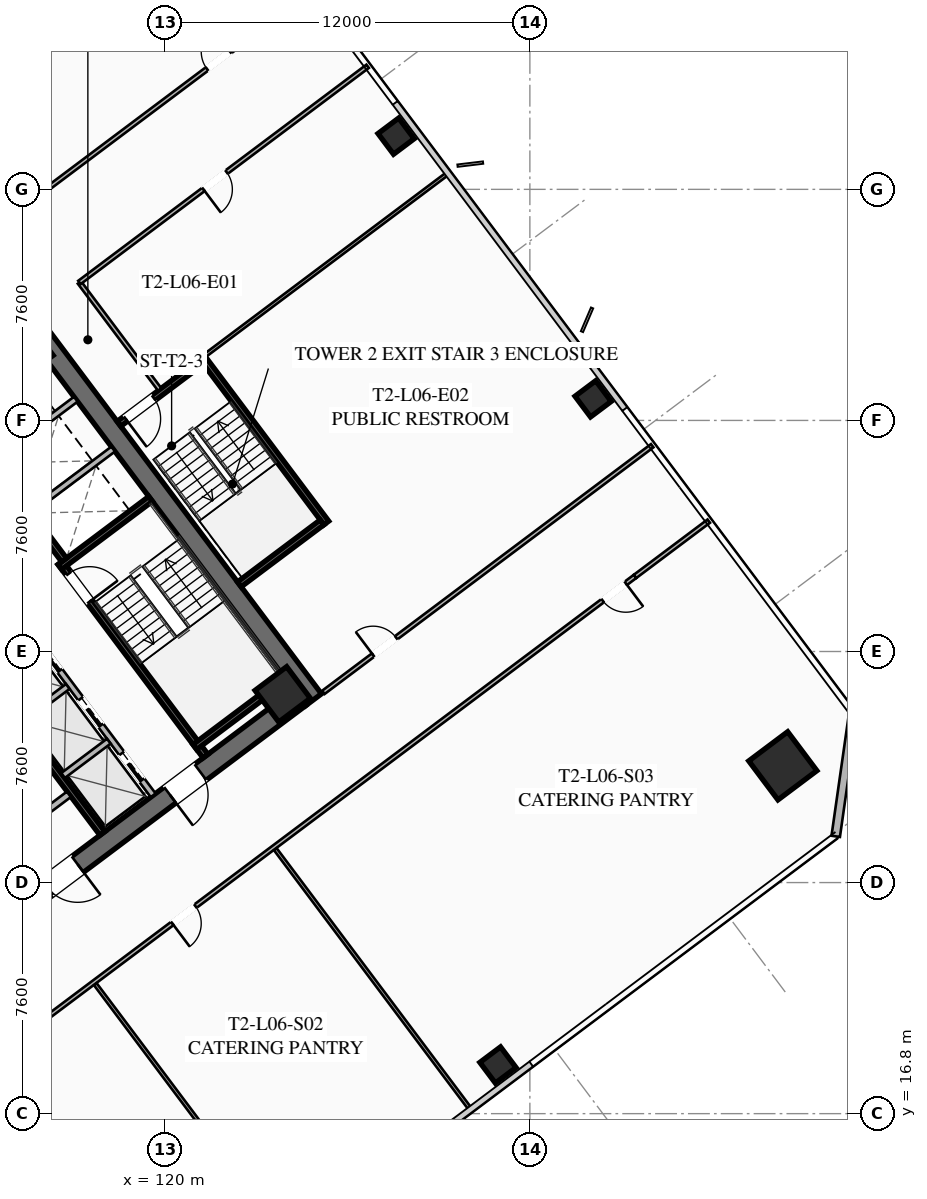
"""IFC4 building model, lengths in metres.
Left out: names, types, materials, properties, quantities, classifications, styles, units other than length and angle.
Written with IfcOpenShell. Run it as: python <this file> out.ifc"""

import sys

from ifc_helpers import new_model, si_unit, direction, frame, frame_2d, origin, origin_2d, place, context, subcontext, project, spatial, rectangle, hollow_rectangle, extrude, element, fill, save


model = new_model("IFC4")
c1 = context("Model", 3, precision=1e-05, world=origin(), true_north=direction((0.0, 1.0)))
c2 = subcontext(c1, "Body", "Model", "MODEL_VIEW")
j1 = project(units=[si_unit("LENGTHUNIT", "METRE"), si_unit("PLANEANGLEUNIT", "RADIAN")], contexts=[c1])
p1 = place(None, origin())
s1 = spatial("IfcSite", under=j1, at=p1, CompositionType="ELEMENT")
p2 = place(p1, origin())
s2 = spatial("IfcBuilding", under=s1, at=p2, CompositionType="ELEMENT")
p3 = place(p2, frame((0.0, 0.0, 28.15)))
s3 = spatial("IfcBuildingStorey", under=s2, at=p3, CompositionType="ELEMENT", Elevation=28.15)
p4 = place(p3, frame((115.524, 42.893, 0.0), z_axis=(0.0, 0.0, 1.0), x_axis=(0.600005007985, -0.799996243986, 0.0)))
e1 = element("IfcWall", 1, at=p4, inside=s3, PredefinedType="SHEAR", context=c2, shape_type="SweptSolid", body=[
    extrude(rectangle(XDim=15.6, YDim=0.65, at=frame_2d((7.8, 0.0))), origin(), (0.0, 0.0, 1.0), 3.55),
])
p5 = place(p3, frame((124.429, 30.478, 0.0), z_axis=(0.0, 0.0, 1.0), x_axis=(-0.799998028465, -0.600002628705, 0.0)))
e2 = element("IfcWall", 2, at=p5, inside=s3, PredefinedType="SHEAR", context=c2, shape_type="SweptSolid", body=[
    extrude(rectangle(XDim=14.86, YDim=0.65, at=frame_2d((7.43, 0.0))), origin(), (0.0, 0.0, 1.0), 3.55),
])
p6 = place(p5, frame((9.13, 0.0, 0.0)))
e3 = element("IfcOpeningElement", 3, at=p6, cuts=e2, PredefinedType="OPENING", context=c2, shape_type="SweptSolid", body=[
    extrude(rectangle(XDim=1.25, YDim=2.25, at=frame_2d((0.625, 1.125))), frame((0.0, 0.335, 0.0), z_axis=(0.0, -1.0, 0.0), x_axis=(1.0, 0.0, 0.0)), (0.0, 0.0, 1.0), 0.67),
])
p7 = place(p5, frame((4.08, 0.0, 0.0)))
e4 = element("IfcOpeningElement", 4, at=p7, cuts=e2, PredefinedType="OPENING", context=c2, shape_type="SweptSolid", body=[
    extrude(rectangle(XDim=1.25, YDim=2.25, at=frame_2d((0.625, 1.125))), frame((0.0, 0.335, 0.0), z_axis=(0.0, -1.0, 0.0), x_axis=(1.0, 0.0, 0.0)), (0.0, 0.0, 1.0), 0.67),
])
for number, where, z_axis, x_axis in (
    (5, (123.87, 30.59, 0.0), (0.0, 0.0, 1.0), (0.8, 0.6, 0.0)),
    (6, (115.41, 41.87, 0.0), (0.0, 0.0, 1.0), (0.8, 0.6, 0.0)),
):
    element("IfcColumn", number, at=place(p3, frame(where, z_axis=z_axis, x_axis=x_axis)), inside=s3, PredefinedType="COLUMN", context=c2, shape_type="SweptSolid", body=[
        extrude(hollow_rectangle(XDim=1.3, YDim=1.3, WallThickness=0.05, at=origin_2d()), origin(), (0.0, 0.0, 1.0), 3.35),
    ])
p8 = place(p3, frame((140.32, 28.24, 0.0), z_axis=(0.0, 0.0, 1.0), x_axis=(0.799999996291, 0.600000004945, 0.0)))
e7 = element("IfcColumn", 7, at=p8, inside=s3, PredefinedType="COLUMN", context=c2, shape_type="SweptSolid", body=[
    extrude(hollow_rectangle(XDim=1.6, YDim=1.6, WallThickness=0.06, at=origin_2d()), origin(), (0.0, 0.0, 1.0), 3.35),
])
for number, where, z_axis, x_axis in (
    (8, (130.95, 18.4, 0.0), (0.0, 0.0, 1.0), (0.8, 0.6, 0.0)),
    (9, (134.08, 40.31, 0.0), (0.0, 0.0, 1.0), (0.8, 0.6, 0.0)),
    (10, (127.6, 48.95, 0.0), (0.0, 0.0, 1.0), (0.8, 0.6, 0.0)),
):
    element("IfcColumn", number, at=place(p3, frame(where, z_axis=z_axis, x_axis=x_axis)), inside=s3, PredefinedType="COLUMN", context=c2, shape_type="SweptSolid", body=[
        extrude(hollow_rectangle(XDim=0.85, YDim=0.85, WallThickness=0.035, at=origin_2d()), origin(), (0.0, 0.0, 1.0), 3.35),
    ])
p9 = place(p3, frame((142.64, 29.98, 0.0), z_axis=(0.0, 0.0, 1.0), x_axis=(-0.14137968631, -0.989955445613, 0.0)))
e11 = element("IfcWall", 11, at=p9, inside=s3, PredefinedType="SOLIDWALL", context=c2, shape_type="SweptSolid", body=[
    extrude(rectangle(XDim=4.101, YDim=0.28, at=frame_2d((2.051, 0.0))), origin(), (0.0, 0.0, 1.0), 3.35),
])
p10 = place(p3, frame((116.56, 34.92, 0.0), z_axis=(0.0, 0.0, 1.0), x_axis=(0.600009827119, -0.799992629566, 0.0)))
e12 = element("IfcWall", 12, at=p10, inside=s3, PredefinedType="SHEAR", context=c2, shape_type="SweptSolid", body=[
    extrude(rectangle(XDim=7.95, YDim=0.2, at=frame_2d((3.975, 0.0))), origin(), (0.0, 0.0, 1.0), 3.35),
])
p11 = place(p10, frame((0.45, 0.0, 0.0)))
e13 = element("IfcOpeningElement", 13, at=p11, cuts=e12, PredefinedType="OPENING", context=c2, shape_type="SweptSolid", body=[
    extrude(rectangle(XDim=1.15, YDim=2.2, at=frame_2d((0.575, 1.1))), frame((0.0, 0.11, 0.0), z_axis=(0.0, -1.0, 0.0), x_axis=(1.0, 0.0, 0.0)), (0.0, 0.0, 1.0), 0.22),
])
for number, where, z_axis, x_axis in (
    (14, (116.54, 34.78, 0.0), (0.0, 0.0, 1.0), (0.8, 0.6, 0.0)),
    (15, (120.98, 28.86, 0.0), (0.0, 0.0, 1.0), (0.8, 0.6, 0.0)),
):
    element("IfcWall", number, at=place(p3, frame(where, z_axis=z_axis, x_axis=x_axis)), inside=s3, PredefinedType="SHEAR", context=c2, shape_type="SweptSolid", body=[
        extrude(rectangle(XDim=3.73, YDim=0.2, at=frame_2d((1.865, 0.0))), origin(), (0.0, 0.0, 1.0), 3.35),
    ])
p12 = place(p3, frame((117.938, 26.016, 0.0), z_axis=(0.0, 0.0, 1.0), x_axis=(-0.600005463273, 0.799995902516, 0.0)))
e16 = element("IfcWall", 16, at=p12, inside=s3, PredefinedType="SHEAR", context=c2, shape_type="SweptSolid", body=[
    extrude(rectangle(XDim=14.3, YDim=0.2, at=frame_2d((7.15, 0.0))), origin(), (0.0, 0.0, 1.0), 3.35),
])
p13 = place(p3, frame((114.316, 25.412, 0.0), z_axis=(0.0, 0.0, 1.0), x_axis=(0.800018601094, 0.59997519774, 0.0)))
e17 = element("IfcWall", 17, at=p13, inside=s3, PredefinedType="SOLIDWALL", context=c2, shape_type="SweptSolid", body=[
    extrude(rectangle(XDim=3.15, YDim=0.22, at=frame_2d((1.575, 0.0))), origin(), (0.0, 0.0, 1.0), 2.703),
])
p14 = place(p13, frame((0.95, 0.0, 0.0)))
e18 = element("IfcOpeningElement", 18, at=p14, cuts=e17, PredefinedType="OPENING", context=c2, shape_type="SweptSolid", body=[
    extrude(rectangle(XDim=1.25, YDim=2.25, at=frame_2d((0.625, 1.125))), frame((0.0, 0.12, 0.0), z_axis=(0.0, -1.0, 0.0), x_axis=(1.0, 0.0, 0.0)), (0.0, 0.0, 1.0), 0.24),
])
p15 = place(p3, frame((112.87, 40.09, 0.0), z_axis=(0.0, 0.0, 1.0), x_axis=(0.599975393228, -0.800018454488, 0.0)))
e19 = element("IfcWall", 19, at=p15, inside=s3, PredefinedType="SHEAR", context=c2, shape_type="SweptSolid", body=[
    extrude(rectangle(XDim=6.35, YDim=0.2, at=frame_2d((3.175, 0.0))), origin(), (0.0, 0.0, 1.0), 3.35),
])
for number, where, z_axis, x_axis in (
    (20, (115.59, 36.63, 0.0), (0.0, 0.0, 1.0), (0.8, 0.6, 0.0)),
    (21, (114.36, 38.27, 0.0), (0.0, 0.0, 1.0), (0.8, 0.6, 0.0)),
):
    element("IfcWall", number, at=place(p3, frame(where, z_axis=z_axis, x_axis=x_axis)), inside=s3, PredefinedType="SOLIDWALL", context=c2, shape_type="SweptSolid", body=[
        extrude(rectangle(XDim=3.38, YDim=0.2, at=frame_2d((1.69, 0.0))), origin(), (0.0, 0.0, 1.0), 3.35),
    ])
p16 = place(p3, frame((119.61, 27.27, 0.0), z_axis=(0.0, 0.0, 1.0), x_axis=(-0.600011488909, 0.79999138319, 0.0)))
e22 = element("IfcWall", 22, at=p16, inside=s3, PredefinedType="SOLIDWALL", context=c2, shape_type="SweptSolid", body=[
    extrude(rectangle(XDim=6.8, YDim=0.2, at=frame_2d((3.4, 0.0))), origin(), (0.0, 0.0, 1.0), 3.35),
])
p17 = place(p16, frame((0.625, 0.0, 0.0)))
e23 = element("IfcOpeningElement", 23, at=p17, cuts=e22, PredefinedType="OPENING", context=c2, shape_type="SweptSolid", body=[
    extrude(rectangle(XDim=1.1, YDim=2.2, at=frame_2d((0.55, 1.1))), frame((0.0, 0.11, 0.0), z_axis=(0.0, -1.0, 0.0), x_axis=(1.0, 0.0, 0.0)), (0.0, 0.0, 1.0), 0.22),
])
p18 = place(p16, frame((2.875, 0.0, 0.0)))
e24 = element("IfcOpeningElement", 24, at=p18, cuts=e22, PredefinedType="OPENING", context=c2, shape_type="SweptSolid", body=[
    extrude(rectangle(XDim=1.1, YDim=2.2, at=frame_2d((0.55, 1.1))), frame((0.0, 0.11, 0.0), z_axis=(0.0, -1.0, 0.0), x_axis=(1.0, 0.0, 0.0)), (0.0, 0.0, 1.0), 0.22),
])
p19 = place(p16, frame((5.125, 0.0, 0.0)))
e25 = element("IfcOpeningElement", 25, at=p19, cuts=e22, PredefinedType="OPENING", context=c2, shape_type="SweptSolid", body=[
    extrude(rectangle(XDim=1.1, YDim=2.2, at=frame_2d((0.55, 1.1))), frame((0.0, 0.11, 0.0), z_axis=(0.0, -1.0, 0.0), x_axis=(1.0, 0.0, 0.0)), (0.0, 0.0, 1.0), 0.22),
])
p20 = place(p3, frame((116.646, 27.922, 0.0), z_axis=(0.0, 0.0, 1.0), x_axis=(0.8, 0.6, 0.0)))
e26 = element("IfcWall", 26, at=p20, inside=s3, PredefinedType="SOLIDWALL", context=c2, shape_type="SweptSolid", body=[
    extrude(rectangle(XDim=1.88, YDim=0.2, at=frame_2d((0.94, 0.0))), origin(), (0.0, 0.0, 1.0), 3.35),
])
p21 = place(p3, frame((115.296, 29.722, 0.0), z_axis=(0.0, 0.0, 1.0), x_axis=(0.799984418148, 0.600020775241, 0.0)))
e27 = element("IfcWall", 27, at=p21, inside=s3, PredefinedType="SOLIDWALL", context=c2, shape_type="SweptSolid", body=[
    extrude(rectangle(XDim=1.88, YDim=0.2, at=frame_2d((0.94, 0.0))), origin(), (0.0, 0.0, 1.0), 3.35),
])
p22 = place(p3, frame((125.304, 36.228, 0.0), z_axis=(0.0, 0.0, 1.0), x_axis=(-0.59998851072, 0.800008616831, 0.0)))
e28 = element("IfcWall", 28, at=p22, inside=s3, PredefinedType="SHEAR", context=c2, shape_type="SweptSolid", body=[
    extrude(rectangle(XDim=6.8, YDim=0.2, at=frame_2d((3.4, 0.0))), origin(), (0.0, 0.0, 1.0), 3.35),
])
p23 = place(p3, frame((121.204, 41.528, 0.0), z_axis=(0.0, 0.0, 1.0), x_axis=(-0.800017232136, -0.599977023131, 0.0)))
e29 = element("IfcWall", 29, at=p23, inside=s3, PredefinedType="SHEAR", context=c2, shape_type="SweptSolid", body=[
    extrude(rectangle(XDim=3.4, YDim=0.2, at=frame_2d((1.7, 0.0))), origin(), (0.0, 0.0, 1.0), 3.35),
])
p24 = place(p23, frame((1.975, 0.0, 0.0)))
e30 = element("IfcOpeningElement", 30, at=p24, cuts=e29, PredefinedType="OPENING", context=c2, shape_type="SweptSolid", body=[
    extrude(rectangle(XDim=1.15, YDim=2.2, at=frame_2d((0.575, 1.1))), frame((0.0, 0.11, 0.0), z_axis=(0.0, -1.0, 0.0), x_axis=(1.0, 0.0, 0.0)), (0.0, 0.0, 1.0), 0.22),
])
p25 = place(p3, frame((122.444, 34.208, 0.0), z_axis=(0.0, 0.0, 1.0), x_axis=(0.79999138319, 0.600011488909, 0.0)))
e31 = element("IfcWall", 31, at=p25, inside=s3, PredefinedType="SHEAR", context=c2, shape_type="SweptSolid", body=[
    extrude(rectangle(XDim=3.4, YDim=0.2, at=frame_2d((1.7, 0.0))), origin(), (0.0, 0.0, 1.0), 3.35),
])
p26 = place(p3, frame((119.824, 40.618, 0.0), z_axis=(0.0, 0.0, 1.0), x_axis=(-0.599982243973, 0.800013316712, 0.0)))
e32 = element("IfcWall", 32, at=p26, inside=s3, PredefinedType="PARTITIONING", context=c2, shape_type="SweptSolid", body=[
    extrude(rectangle(XDim=4.4, YDim=0.135, at=frame_2d((2.2, 0.0))), origin(), (0.0, 0.0, 1.0), 2.703),
])
p27 = place(p3, frame((98.516, 34.012, 0.0), z_axis=(0.0, 0.0, 1.0), x_axis=(0.799998035726, 0.600002619023, 0.0)))
e33 = element("IfcWall", 33, at=p27, inside=s3, PredefinedType="PARTITIONING", context=c2, shape_type="SweptSolid", body=[
    extrude(rectangle(XDim=29.83, YDim=0.135, at=frame_2d((14.915, 0.0))), origin(), (0.0, 0.0, 1.0), 2.703),
])
p28 = place(p27, frame((0.3, 0.0, 0.0)))
e34 = element("IfcOpeningElement", 34, at=p28, cuts=e33, PredefinedType="OPENING", context=c2, shape_type="SweptSolid", body=[
    extrude(rectangle(XDim=0.95, YDim=2.05, at=frame_2d((0.475, 1.025))), frame((0.0, 0.077, 0.0), z_axis=(0.0, -1.0, 0.0), x_axis=(1.0, 0.0, 0.0)), (0.0, 0.0, 1.0), 0.155),
])
p29 = place(p27, frame((10.829, 0.0, 0.0)))
e35 = element("IfcOpeningElement", 35, at=p29, cuts=e33, PredefinedType="OPENING", context=c2, shape_type="SweptSolid", body=[
    extrude(rectangle(XDim=0.95, YDim=2.05, at=frame_2d((0.475, 1.025))), frame((0.0, 0.077, 0.0), z_axis=(0.0, -1.0, 0.0), x_axis=(1.0, 0.0, 0.0)), (0.0, 0.0, 1.0), 0.155),
])
p30 = place(p27, frame((28.58, 0.0, 0.0)))
e36 = element("IfcOpeningElement", 36, at=p30, cuts=e33, PredefinedType="OPENING", context=c2, shape_type="SweptSolid", body=[
    extrude(rectangle(XDim=0.95, YDim=2.05, at=frame_2d((0.475, 1.025))), frame((0.0, 0.077, 0.0), z_axis=(0.0, -1.0, 0.0), x_axis=(1.0, 0.0, 0.0)), (0.0, 0.0, 1.0), 0.155),
])
p31 = place(p3, frame((135.46, 34.47, 0.0), z_axis=(0.0, 0.0, 1.0), x_axis=(-0.800000982127, -0.599998690494, 0.0)))
e37 = element("IfcWall", 37, at=p31, inside=s3, PredefinedType="PARTITIONING", context=c2, shape_type="SweptSolid", body=[
    extrude(rectangle(XDim=29.83, YDim=0.135, at=frame_2d((14.915, 0.0))), origin(), (0.0, 0.0, 1.0), 2.703),
])
p32 = place(p31, frame((28.5, 0.0, 0.0)))
e38 = element("IfcOpeningElement", 38, at=p32, cuts=e37, PredefinedType="OPENING", context=c2, shape_type="SweptSolid", body=[
    extrude(rectangle(XDim=0.95, YDim=2.05, at=frame_2d((0.475, 1.025))), frame((0.0, 0.077, 0.0), z_axis=(0.0, -1.0, 0.0), x_axis=(1.0, 0.0, 0.0)), (0.0, 0.0, 1.0), 0.155),
])
p33 = place(p31, frame((18.075, 0.0, 0.0)))
e39 = element("IfcOpeningElement", 39, at=p33, cuts=e37, PredefinedType="OPENING", context=c2, shape_type="SweptSolid", body=[
    extrude(rectangle(XDim=0.95, YDim=2.05, at=frame_2d((0.475, 1.025))), frame((0.0, 0.077, 0.0), z_axis=(0.0, -1.0, 0.0), x_axis=(1.0, 0.0, 0.0)), (0.0, 0.0, 1.0), 0.155),
])
p34 = place(p31, frame((0.38, 0.0, 0.0)))
e40 = element("IfcOpeningElement", 40, at=p34, cuts=e37, PredefinedType="OPENING", context=c2, shape_type="SweptSolid", body=[
    extrude(rectangle(XDim=0.95, YDim=2.05, at=frame_2d((0.475, 1.025))), frame((0.0, 0.077, 0.0), z_axis=(0.0, -1.0, 0.0), x_axis=(1.0, 0.0, 0.0)), (0.0, 0.0, 1.0), 0.155),
])
p35 = place(p3, frame((135.46, 34.47, 0.0), z_axis=(0.0, 0.0, 1.0), x_axis=(0.799990331366, 0.600012891296, 0.0)))
e41 = element("IfcWall", 41, at=p35, inside=s3, PredefinedType="PARTITIONING", context=c2, shape_type="SweptSolid", body=[
    extrude(rectangle(XDim=3.03, YDim=0.135, at=frame_2d((1.515, 0.0))), origin(), (0.0, 0.0, 1.0), 2.703),
])
p36 = place(p3, frame((124.128, 12.496, 0.0), z_axis=(0.0, 0.0, 1.0), x_axis=(-0.600003650761, 0.799997261916, 0.0)))
e42 = element("IfcWall", 42, at=p36, inside=s3, PredefinedType="PARTITIONING", context=c2, shape_type="SweptSolid", body=[
    extrude(rectangle(XDim=10.7, YDim=0.11, at=frame_2d((5.35, 0.0))), origin(), (0.0, 0.0, 1.0), 2.703),
])
p37 = place(p3, frame((130.048, 16.936, 0.0), z_axis=(0.0, 0.0, 1.0), x_axis=(-0.600007301277, 0.79999452399, 0.0)))
e43 = element("IfcWall", 43, at=p37, inside=s3, PredefinedType="PARTITIONING", context=c2, shape_type="SweptSolid", body=[
    extrude(rectangle(XDim=10.7, YDim=0.11, at=frame_2d((5.35, 0.0))), origin(), (0.0, 0.0, 1.0), 2.703),
])
p38 = place(p3, frame((126.664, 51.248, 0.0), z_axis=(0.0, 0.0, 1.0), x_axis=(-0.799995055373, -0.600006592779, 0.0)))
e44 = element("IfcWall", 44, at=p38, inside=s3, PredefinedType="PARTITIONING", context=c2, shape_type="SweptSolid", body=[
    extrude(rectangle(XDim=11.85, YDim=0.135, at=frame_2d((5.925, 0.0))), origin(), (0.0, 0.0, 1.0), 2.703),
])
p39 = place(p38, frame((5.8, 0.0, 0.0)))
e45 = element("IfcOpeningElement", 45, at=p39, cuts=e44, PredefinedType="OPENING", context=c2, shape_type="SweptSolid", body=[
    extrude(rectangle(XDim=0.95, YDim=2.05, at=frame_2d((0.475, 1.025))), frame((0.0, 0.077, 0.0), z_axis=(0.0, -1.0, 0.0), x_axis=(1.0, 0.0, 0.0)), (0.0, 0.0, 1.0), 0.155),
])
p40 = place(p3, frame((125.208, 30.656, 0.0), z_axis=(0.0, 0.0, 1.0), x_axis=(0.799995666112, 0.600005778473, 0.0)))
e46 = element("IfcWall", 46, at=p40, inside=s3, PredefinedType="PARTITIONING", context=c2, shape_type="SweptSolid", body=[
    extrude(rectangle(XDim=13.52, YDim=0.135, at=frame_2d((6.76, 0.0))), origin(), (0.0, 0.0, 1.0), 2.703),
])
p41 = place(p40, frame((2.045, 0.0, 0.0)))
e47 = element("IfcOpeningElement", 47, at=p41, cuts=e46, PredefinedType="OPENING", context=c2, shape_type="SweptSolid", body=[
    extrude(rectangle(XDim=0.95, YDim=2.05, at=frame_2d((0.475, 1.025))), frame((0.0, 0.077, 0.0), z_axis=(0.0, -1.0, 0.0), x_axis=(1.0, 0.0, 0.0)), (0.0, 0.0, 1.0), 0.155),
])
p42 = place(p3, frame((129.304, 47.728, 0.0), z_axis=(0.0, 0.0, 1.0), x_axis=(-0.8, -0.6, 0.0)))
e48 = element("IfcWall", 48, at=p42, inside=s3, PredefinedType="PARTITIONING", context=c2, shape_type="SweptSolid", body=[
    extrude(rectangle(XDim=10.0, YDim=0.11, at=frame_2d((5.0, 0.0))), origin(), (0.0, 0.0, 1.0), 2.703),
])
p43 = place(p6, origin())
e49 = element("IfcDoor", 49, at=p43, inside=s3, OperationType="SINGLE_SWING_LEFT", PredefinedType="DOOR", context=c2, shape_type="SweptSolid", body=[
    extrude(rectangle(XDim=1.25, YDim=2.25, at=frame_2d((0.625, 1.125))), frame((0.0, 0.025, 0.0), z_axis=(0.0, -1.0, 0.0), x_axis=(1.0, 0.0, 0.0)), (0.0, 0.0, 1.0), 0.05),
])
fill(e3, e49)
p44 = place(p7, origin())
e50 = element("IfcDoor", 50, at=p44, inside=s3, OperationType="SINGLE_SWING_RIGHT", PredefinedType="DOOR", context=c2, shape_type="SweptSolid", body=[
    extrude(rectangle(XDim=1.25, YDim=2.25, at=frame_2d((0.625, 1.125))), frame((0.0, 0.025, 0.0), z_axis=(0.0, -1.0, 0.0), x_axis=(1.0, 0.0, 0.0)), (0.0, 0.0, 1.0), 0.05),
])
fill(e4, e50)
p45 = place(p11, origin())
e51 = element("IfcDoor", 51, at=p45, inside=s3, OperationType="SINGLE_SWING_RIGHT", PredefinedType="DOOR", context=c2, shape_type="SweptSolid", body=[
    extrude(rectangle(XDim=1.15, YDim=2.2, at=frame_2d((0.575, 1.1))), frame((0.0, 0.025, 0.0), z_axis=(0.0, -1.0, 0.0), x_axis=(1.0, 0.0, 0.0)), (0.0, 0.0, 1.0), 0.05),
])
fill(e13, e51)
p46 = place(p24, origin())
e52 = element("IfcDoor", 52, at=p46, inside=s3, OperationType="SINGLE_SWING_RIGHT", PredefinedType="DOOR", context=c2, shape_type="SweptSolid", body=[
    extrude(rectangle(XDim=1.15, YDim=2.2, at=frame_2d((0.575, 1.1))), frame((0.0, 0.025, 0.0), z_axis=(0.0, -1.0, 0.0), x_axis=(1.0, 0.0, 0.0)), (0.0, 0.0, 1.0), 0.05),
])
fill(e30, e52)
p47 = place(p30, origin())
e53 = element("IfcDoor", 53, at=p47, inside=s3, OperationType="SINGLE_SWING_RIGHT", PredefinedType="DOOR", context=c2, shape_type="SweptSolid", body=[
    extrude(rectangle(XDim=0.95, YDim=2.05, at=frame_2d((0.475, 1.025))), frame((0.0, 0.025, 0.0), z_axis=(0.0, -1.0, 0.0), x_axis=(1.0, 0.0, 0.0)), (0.0, 0.0, 1.0), 0.05),
])
fill(e36, e53)
p48 = place(p33, origin())
e54 = element("IfcDoor", 54, at=p48, inside=s3, OperationType="SINGLE_SWING_RIGHT", PredefinedType="DOOR", context=c2, shape_type="SweptSolid", body=[
    extrude(rectangle(XDim=0.95, YDim=2.05, at=frame_2d((0.475, 1.025))), frame((0.0, 0.025, 0.0), z_axis=(0.0, -1.0, 0.0), x_axis=(1.0, 0.0, 0.0)), (0.0, 0.0, 1.0), 0.05),
])
fill(e39, e54)
p49 = place(p34, origin())
e55 = element("IfcDoor", 55, at=p49, inside=s3, OperationType="SINGLE_SWING_LEFT", PredefinedType="DOOR", context=c2, shape_type="SweptSolid", body=[
    extrude(rectangle(XDim=0.95, YDim=2.05, at=frame_2d((0.475, 1.025))), frame((0.0, 0.025, 0.0), z_axis=(0.0, -1.0, 0.0), x_axis=(1.0, 0.0, 0.0)), (0.0, 0.0, 1.0), 0.05),
])
fill(e40, e55)
p50 = place(p39, origin())
e56 = element("IfcDoor", 56, at=p50, inside=s3, OperationType="SINGLE_SWING_RIGHT", PredefinedType="DOOR", context=c2, shape_type="SweptSolid", body=[
    extrude(rectangle(XDim=0.95, YDim=2.05, at=frame_2d((0.475, 1.025))), frame((0.0, 0.025, 0.0), z_axis=(0.0, -1.0, 0.0), x_axis=(1.0, 0.0, 0.0)), (0.0, 0.0, 1.0), 0.05),
])
fill(e45, e56)
p51 = place(p41, origin())
e57 = element("IfcDoor", 57, at=p51, inside=s3, OperationType="SINGLE_SWING_LEFT", PredefinedType="DOOR", context=c2, shape_type="SweptSolid", body=[
    extrude(rectangle(XDim=0.95, YDim=2.05, at=frame_2d((0.475, 1.025))), frame((0.0, 0.025, 0.0), z_axis=(0.0, -1.0, 0.0), x_axis=(1.0, 0.0, 0.0)), (0.0, 0.0, 1.0), 0.05),
])
fill(e47, e57)
p52 = place(p17, origin())
e58 = element("IfcDoor", 58, at=p52, inside=s3, OperationType="SLIDING_TO_LEFT", PredefinedType="DOOR", context=c2, shape_type="SweptSolid", body=[
    extrude(rectangle(XDim=1.1, YDim=2.2, at=frame_2d((0.55, 1.1))), frame((0.0, 0.025, 0.0), z_axis=(0.0, -1.0, 0.0), x_axis=(1.0, 0.0, 0.0)), (0.0, 0.0, 1.0), 0.05),
])
fill(e23, e58)
p53 = place(p18, origin())
e59 = element("IfcDoor", 59, at=p53, inside=s3, OperationType="SLIDING_TO_LEFT", PredefinedType="DOOR", context=c2, shape_type="SweptSolid", body=[
    extrude(rectangle(XDim=1.1, YDim=2.2, at=frame_2d((0.55, 1.1))), frame((0.0, 0.025, 0.0), z_axis=(0.0, -1.0, 0.0), x_axis=(1.0, 0.0, 0.0)), (0.0, 0.0, 1.0), 0.05),
])
fill(e24, e59)
p54 = place(p19, origin())
e60 = element("IfcDoor", 60, at=p54, inside=s3, OperationType="SLIDING_TO_LEFT", PredefinedType="DOOR", context=c2, shape_type="SweptSolid", body=[
    extrude(rectangle(XDim=1.1, YDim=2.2, at=frame_2d((0.55, 1.1))), frame((0.0, 0.025, 0.0), z_axis=(0.0, -1.0, 0.0), x_axis=(1.0, 0.0, 0.0)), (0.0, 0.0, 1.0), 0.05),
])
fill(e25, e60)
save(model, sys.argv[1])
